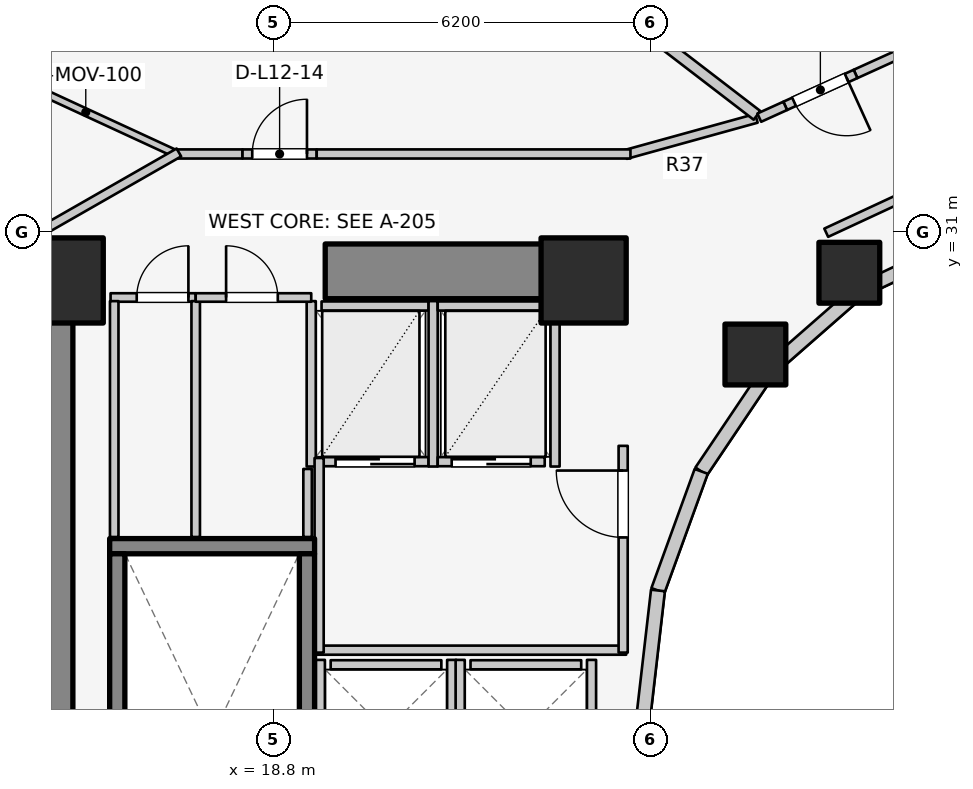
"""IFC4 building model, lengths in metres.
Left out: names, types, materials, properties, quantities, classifications, styles, units other than length and angle.
Written with IfcOpenShell. Run it as: python <this file> out.ifc"""

import sys

from ifc_helpers import new_model, si_unit, direction, frame, frame_2d, origin, origin_2d, place, context, subcontext, project, spatial, rectangle, extrude, element, fill, save


model = new_model("IFC4")
c1 = context("Model", 3, precision=1e-05, world=origin(), true_north=direction((0.0, 1.0)))
c2 = subcontext(c1, "Body", "Model", "MODEL_VIEW")
j1 = project(units=[si_unit("LENGTHUNIT", "METRE"), si_unit("PLANEANGLEUNIT", "RADIAN")], contexts=[c1])
p1 = place(None, origin())
s1 = spatial("IfcSite", under=j1, at=p1, CompositionType="ELEMENT")
p2 = place(p1, origin())
s2 = spatial("IfcBuilding", under=s1, at=p2, CompositionType="ELEMENT")
p3 = place(p2, frame((0.0, 0.0, 43.1)))
s3 = spatial("IfcBuildingStorey", under=s2, at=p3, CompositionType="ELEMENT", Elevation=43.1)
p4 = place(p3, frame((15.05, 17.05, 0.0), z_axis=(0.0, 0.0, 1.0), x_axis=(0.0, 1.0, 0.0)))
e1 = element("IfcWall", 1, at=p4, inside=s3, PredefinedType="SHEAR", context=c2, shape_type="SweptSolid", body=[
    extrude(rectangle(XDim=12.8, YDim=0.9, at=frame_2d((6.4, 0.0))), origin(), (0.0, 0.0, 1.0), 3.1),
])
p5 = place(p3, frame((19.65, 30.35, 0.0), z_axis=(0.0, 0.0, 1.0), x_axis=(1.0, 0.0, 0.0)))
e2 = element("IfcWall", 2, at=p5, inside=s3, PredefinedType="SHEAR", context=c2, shape_type="SweptSolid", body=[
    extrude(rectangle(XDim=4.5, YDim=0.9, at=frame_2d((2.25, 0.0))), origin(), (0.0, 0.0, 1.0), 3.1),
])
p6 = place(p3, frame((16.105, 25.83, 0.0), z_axis=(0.0, 0.0, 1.0), x_axis=(1.0, 0.0, 0.0)))
e3 = element("IfcWall", 3, at=p6, inside=s3, PredefinedType="SOLIDWALL", context=c2, shape_type="SweptSolid", body=[
    extrude(rectangle(XDim=3.37, YDim=0.25, at=frame_2d((1.685, 0.0))), origin(), (0.0, 0.0, 1.0), 3.1),
])
for number, where, z_axis, x_axis in (
    (4, (16.23, 17.895, 0.0), (0.0, 0.0, 1.0), (0.0, 1.0, 0.0)),
    (5, (19.35, 17.895, 0.0), (0.0, 0.0, 1.0), (0.0, 1.0, 0.0)),
):
    element("IfcWall", number, at=place(p3, frame(where, z_axis=z_axis, x_axis=x_axis)), inside=s3, PredefinedType="SOLIDWALL", context=c2, shape_type="SweptSolid", body=[
        extrude(rectangle(XDim=7.81, YDim=0.25, at=frame_2d((3.905, 0.0))), origin(), (0.0, 0.0, 1.0), 3.1),
    ])
for number, where, z_axis, x_axis in (
    (6, (23.9, 30.2, 0.0), (0.0, 0.0, 1.0), (1.0, 0.0, 0.0)),
    (7, (15.3, 30.2, 0.0), (0.0, 0.0, 1.0), (1.0, 0.0, 0.0)),
):
    element("IfcColumn", number, at=place(p3, frame(where, z_axis=z_axis, x_axis=x_axis)), inside=s3, PredefinedType="COLUMN", context=c2, shape_type="SweptSolid", body=[
        extrude(rectangle(XDim=1.4, YDim=1.4, at=origin_2d()), origin(), (0.0, 0.0, 1.0), 3.1),
    ])
for number, where, z_axis, x_axis in (
    (8, (28.27, 30.327, 0.0), (0.0, 0.0, 1.0), (1.0, 0.0, 0.0)),
    (9, (26.725, 28.982, 0.0), (0.0, 0.0, 1.0), (1.0, 0.0, 0.0)),
):
    element("IfcColumn", number, at=place(p3, frame(where, z_axis=z_axis, x_axis=x_axis)), inside=s3, PredefinedType="COLUMN", context=c2, shape_type="SweptSolid", body=[
        extrude(rectangle(XDim=1.0, YDim=1.0, at=origin_2d()), origin(), (0.0, 0.0, 1.0), 3.1),
    ])
p7 = place(p3, frame((30.157, 30.843, 0.0), z_axis=(0.0, 0.0, 1.0), x_axis=(-0.904179699603, -0.427152280606, 0.0)))
e10 = element("IfcWall", 10, at=p7, inside=s3, PredefinedType="STANDARD", context=c2, shape_type="SweptSolid", body=[
    extrude(rectangle(XDim=1.899, YDim=0.23, at=frame_2d((0.95, 0.0))), origin(), (0.0, 0.0, 1.0), 1.22),
])
p8 = place(p3, frame((28.44, 30.032, 0.0), z_axis=(0.0, 0.0, 1.0), x_axis=(-0.752576694707, -0.658504607869, 0.0)))
e11 = element("IfcWall", 11, at=p8, inside=s3, PredefinedType="STANDARD", context=c2, shape_type="SweptSolid", body=[
    extrude(rectangle(XDim=1.959, YDim=0.23, at=frame_2d((0.98, 0.0))), origin(), (0.0, 0.0, 1.0), 1.22),
])
p9 = place(p3, frame((26.965, 28.742, 0.0), z_axis=(0.0, 0.0, 1.0), x_axis=(-0.558197800898, -0.829707909492, 0.0)))
e12 = element("IfcWall", 12, at=p9, inside=s3, PredefinedType="STANDARD", context=c2, shape_type="SweptSolid", body=[
    extrude(rectangle(XDim=2.027, YDim=0.23, at=frame_2d((1.013, 0.0))), origin(), (0.0, 0.0, 1.0), 1.22),
])
p10 = place(p3, frame((25.834, 27.06, 0.0), z_axis=(0.0, 0.0, 1.0), x_axis=(-0.341423187295, -0.93990968033, 0.0)))
e13 = element("IfcWall", 13, at=p10, inside=s3, PredefinedType="STANDARD", context=c2, shape_type="SweptSolid", body=[
    extrude(rectangle(XDim=2.084, YDim=0.23, at=frame_2d((1.042, 0.0))), origin(), (0.0, 0.0, 1.0), 2.56),
])
p11 = place(p3, frame((25.123, 25.102, 0.0), z_axis=(0.0, 0.0, 1.0), x_axis=(-0.114711713601, -0.993398823617, 0.0)))
e14 = element("IfcWall", 14, at=p11, inside=s3, PredefinedType="STANDARD", context=c2, shape_type="SweptSolid", body=[
    extrude(rectangle(XDim=2.115, YDim=0.23, at=frame_2d((1.058, 0.0))), origin(), (0.0, 0.0, 1.0), 2.56),
])
p12 = place(p3, frame((19.74, 23.88, 0.0), z_axis=(0.0, 0.0, 1.0), x_axis=(1.0, 0.0, 0.0)))
e15 = element("IfcWall", 15, at=p12, inside=s3, PredefinedType="SOLIDWALL", context=c2, shape_type="SweptSolid", body=[
    extrude(rectangle(XDim=1.82, YDim=0.15, at=frame_2d((0.91, 0.0))), origin(), (0.0, 0.0, 1.0), 2.575),
])
for number, where, z_axis, x_axis in (
    (16, (19.57, 21.64, 0.0), (0.0, 0.0, 1.0), (0.0, 1.0, 0.0)),
    (17, (21.73, 21.64, 0.0), (0.0, 0.0, 1.0), (0.0, 1.0, 0.0)),
):
    element("IfcWall", number, at=place(p3, frame(where, z_axis=z_axis, x_axis=x_axis)), inside=s3, PredefinedType="SOLIDWALL", context=c2, shape_type="SweptSolid", body=[
        extrude(rectangle(XDim=2.32, YDim=0.15, at=frame_2d((1.16, 0.0))), origin(), (0.0, 0.0, 1.0), 2.575),
    ])
p13 = place(p3, frame((22.04, 23.88, 0.0), z_axis=(0.0, 0.0, 1.0), x_axis=(1.0, 0.0, 0.0)))
e18 = element("IfcWall", 18, at=p13, inside=s3, PredefinedType="SOLIDWALL", context=c2, shape_type="SweptSolid", body=[
    extrude(rectangle(XDim=1.82, YDim=0.15, at=frame_2d((0.91, 0.0))), origin(), (0.0, 0.0, 1.0), 2.12),
])
p14 = place(p3, frame((21.87, 21.64, 0.0), z_axis=(0.0, 0.0, 1.0), x_axis=(0.0, 1.0, 0.0)))
e19 = element("IfcWall", 19, at=p14, inside=s3, PredefinedType="SOLIDWALL", context=c2, shape_type="SweptSolid", body=[
    extrude(rectangle(XDim=2.32, YDim=0.15, at=frame_2d((1.16, 0.0))), origin(), (0.0, 0.0, 1.0), 2.575),
])
p15 = place(p3, frame((24.03, 21.64, 0.0), z_axis=(0.0, 0.0, 1.0), x_axis=(0.0, 1.0, 0.0)))
e20 = element("IfcWall", 20, at=p15, inside=s3, PredefinedType="SOLIDWALL", context=c2, shape_type="SweptSolid", body=[
    extrude(rectangle(XDim=2.32, YDim=0.15, at=frame_2d((1.16, 0.0))), origin(), (0.0, 0.0, 1.0), 2.12),
])
p16 = place(p3, frame((19.59, 27.22, 0.0), z_axis=(0.0, 0.0, 1.0), x_axis=(1.0, 0.0, 0.0)))
e21 = element("IfcWall", 21, at=p16, inside=s3, PredefinedType="SOLIDWALL", context=c2, shape_type="SweptSolid", body=[
    extrude(rectangle(XDim=1.76, YDim=0.15, at=frame_2d((0.88, 0.0))), origin(), (0.0, 0.0, 1.0), 2.575),
])
p17 = place(p16, frame((0.23, 0.0, 0.0)))
e22 = element("IfcOpeningElement", 22, at=p17, cuts=e21, PredefinedType="OPENING", context=c2, shape_type="SweptSolid", body=[
    extrude(rectangle(XDim=1.3, YDim=2.1, at=frame_2d((0.65, 1.05))), frame((0.0, 0.085, 0.0), z_axis=(0.0, -1.0, 0.0), x_axis=(1.0, 0.0, 0.0)), (0.0, 0.0, 1.0), 0.17),
])
p18 = place(p3, frame((19.59, 29.78, 0.0), z_axis=(0.0, 0.0, 1.0), x_axis=(1.0, 0.0, 0.0)))
e23 = element("IfcWall", 23, at=p18, inside=s3, PredefinedType="SOLIDWALL", context=c2, shape_type="SweptSolid", body=[
    extrude(rectangle(XDim=1.76, YDim=0.15, at=frame_2d((0.88, 0.0))), origin(), (0.0, 0.0, 1.0), 2.575),
])
for number, where, z_axis, x_axis in (
    (24, (19.42, 27.14, 0.0), (0.0, 0.0, 1.0), (0.0, 1.0, 0.0)),
    (25, (21.425, 27.14, 0.0), (0.0, 0.0, 1.0), (0.0, 1.0, 0.0)),
):
    element("IfcWall", number, at=place(p3, frame(where, z_axis=z_axis, x_axis=x_axis)), inside=s3, PredefinedType="SOLIDWALL", context=c2, shape_type="SweptSolid", body=[
        extrude(rectangle(XDim=2.72, YDim=0.15, at=frame_2d((1.36, 0.0))), origin(), (0.0, 0.0, 1.0), 2.575),
    ])
p19 = place(p3, frame((21.5, 27.22, 0.0), z_axis=(0.0, 0.0, 1.0), x_axis=(1.0, 0.0, 0.0)))
e26 = element("IfcWall", 26, at=p19, inside=s3, PredefinedType="SOLIDWALL", context=c2, shape_type="SweptSolid", body=[
    extrude(rectangle(XDim=1.76, YDim=0.15, at=frame_2d((0.88, 0.0))), origin(), (0.0, 0.0, 1.0), 2.575),
])
p20 = place(p19, frame((0.23, 0.0, 0.0)))
e27 = element("IfcOpeningElement", 27, at=p20, cuts=e26, PredefinedType="OPENING", context=c2, shape_type="SweptSolid", body=[
    extrude(rectangle(XDim=1.3, YDim=2.1, at=frame_2d((0.65, 1.05))), frame((0.0, 0.085, 0.0), z_axis=(0.0, -1.0, 0.0), x_axis=(1.0, 0.0, 0.0)), (0.0, 0.0, 1.0), 0.17),
])
p21 = place(p3, frame((21.5, 29.78, 0.0), z_axis=(0.0, 0.0, 1.0), x_axis=(1.0, 0.0, 0.0)))
e28 = element("IfcWall", 28, at=p21, inside=s3, PredefinedType="SOLIDWALL", context=c2, shape_type="SweptSolid", body=[
    extrude(rectangle(XDim=1.76, YDim=0.15, at=frame_2d((0.88, 0.0))), origin(), (0.0, 0.0, 1.0), 2.575),
])
p22 = place(p3, frame((23.43, 27.14, 0.0), z_axis=(0.0, 0.0, 1.0), x_axis=(0.0, 1.0, 0.0)))
e29 = element("IfcWall", 29, at=p22, inside=s3, PredefinedType="SOLIDWALL", context=c2, shape_type="SweptSolid", body=[
    extrude(rectangle(XDim=2.72, YDim=0.15, at=frame_2d((1.36, 0.0))), origin(), (0.0, 0.0, 1.0), 2.575),
])
p23 = place(p3, frame((19.52, 24.12, 0.0), z_axis=(0.0, 0.0, 1.0), x_axis=(1.0, 0.0, 0.0)))
e30 = element("IfcWall", 30, at=p23, inside=s3, PredefinedType="PARTITIONING", context=c2, shape_type="SweptSolid", body=[
    extrude(rectangle(XDim=5.08, YDim=0.15, at=frame_2d((2.54, 0.0))), origin(), (0.0, 0.0, 1.0), 2.12),
])
p24 = place(p3, frame((19.55, 24.08, 0.0), z_axis=(0.0, 0.0, 1.0), x_axis=(0.0, 1.0, 0.0)))
e31 = element("IfcWall", 31, at=p24, inside=s3, PredefinedType="PARTITIONING", context=c2, shape_type="SweptSolid", body=[
    extrude(rectangle(XDim=3.2, YDim=0.15, at=frame_2d((1.6, 0.0))), origin(), (0.0, 0.0, 1.0), 2.575),
])
p25 = place(p3, frame((24.55, 24.08, 0.0), z_axis=(0.0, 0.0, 1.0), x_axis=(0.0, 1.0, 0.0)))
e32 = element("IfcWall", 32, at=p25, inside=s3, PredefinedType="PARTITIONING", context=c2, shape_type="SweptSolid", body=[
    extrude(rectangle(XDim=3.4, YDim=0.15, at=frame_2d((1.7, 0.0))), origin(), (0.0, 0.0, 1.0), 2.575),
])
p26 = place(p25, frame((1.894, 0.0, 0.0)))
e33 = element("IfcOpeningElement", 33, at=p26, cuts=e32, PredefinedType="OPENING", context=c2, shape_type="SweptSolid", body=[
    extrude(rectangle(XDim=1.1, YDim=2.1, at=frame_2d((0.55, 1.05))), frame((0.0, 0.085, 0.0), z_axis=(0.0, -1.0, 0.0), x_axis=(1.0, 0.0, 0.0)), (0.0, 0.0, 1.0), 0.17),
])
p27 = place(p3, frame((16.12, 29.92, 0.0), z_axis=(0.0, 0.0, 1.0), x_axis=(1.0, 0.0, 0.0)))
e34 = element("IfcWall", 34, at=p27, inside=s3, PredefinedType="PLUMBINGWALL", context=c2, shape_type="SweptSolid", body=[
    extrude(rectangle(XDim=1.4, YDim=0.14, at=frame_2d((0.7, 0.0))), origin(), (0.0, 0.0, 1.0), 2.575),
])
p28 = place(p27, frame((0.43, 0.0, 0.0)))
e35 = element("IfcOpeningElement", 35, at=p28, cuts=e34, PredefinedType="OPENING", context=c2, shape_type="SweptSolid", body=[
    extrude(rectangle(XDim=0.85, YDim=2.05, at=frame_2d((0.425, 1.025))), frame((0.0, 0.08, 0.0), z_axis=(0.0, -1.0, 0.0), x_axis=(1.0, 0.0, 0.0)), (0.0, 0.0, 1.0), 0.16),
])
for number, where, z_axis, x_axis in (
    (36, (16.18, 25.98, 0.0), (0.0, 0.0, 1.0), (0.0, 1.0, 0.0)),
    (37, (17.52, 25.98, 0.0), (0.0, 0.0, 1.0), (0.0, 1.0, 0.0)),
):
    element("IfcWall", number, at=place(p3, frame(where, z_axis=z_axis, x_axis=x_axis)), inside=s3, PredefinedType="PLUMBINGWALL", context=c2, shape_type="SweptSolid", body=[
        extrude(rectangle(XDim=3.88, YDim=0.14, at=frame_2d((1.94, 0.0))), origin(), (0.0, 0.0, 1.0), 2.575),
    ])
p29 = place(p3, frame((17.52, 29.92, 0.0), z_axis=(0.0, 0.0, 1.0), x_axis=(1.0, 0.0, 0.0)))
e38 = element("IfcWall", 38, at=p29, inside=s3, PredefinedType="PLUMBINGWALL", context=c2, shape_type="SweptSolid", body=[
    extrude(rectangle(XDim=1.9, YDim=0.14, at=frame_2d((0.95, 0.0))), origin(), (0.0, 0.0, 1.0), 2.575),
])
p30 = place(p29, frame((0.5, 0.0, 0.0)))
e39 = element("IfcOpeningElement", 39, at=p30, cuts=e38, PredefinedType="OPENING", context=c2, shape_type="SweptSolid", body=[
    extrude(rectangle(XDim=0.85, YDim=2.05, at=frame_2d((0.425, 1.025))), frame((0.0, 0.08, 0.0), z_axis=(0.0, -1.0, 0.0), x_axis=(1.0, 0.0, 0.0)), (0.0, 0.0, 1.0), 0.16),
])
p31 = place(p3, frame((19.36, 25.98, 0.0), z_axis=(0.0, 0.0, 1.0), x_axis=(0.0, 1.0, 0.0)))
e40 = element("IfcWall", 40, at=p31, inside=s3, PredefinedType="PLUMBINGWALL", context=c2, shape_type="SweptSolid", body=[
    extrude(rectangle(XDim=1.12, YDim=0.14, at=frame_2d((0.56, 0.0))), origin(), (0.0, 0.0, 1.0), 2.575),
])
p32 = place(p3, frame((29.873, 31.906, 0.0), z_axis=(0.0, 0.0, 1.0), x_axis=(-0.906943449489, -0.421252393975, 0.0)))
e41 = element("IfcWall", 41, at=p32, inside=s3, PredefinedType="PARTITIONING", context=c2, shape_type="SweptSolid", body=[
    extrude(rectangle(XDim=2.186, YDim=0.15, at=frame_2d((1.093, 0.0))), origin(), (0.0, 0.0, 1.0), 1.22),
])
p33 = place(p3, frame((17.245, 32.259, 0.0), z_axis=(0.0, 0.0, 1.0), x_axis=(-0.907887445426, 0.419214010307, 0.0)))
e42 = element("IfcWall", 42, at=p33, inside=s3, PredefinedType="MOVABLE", context=c2, shape_type="SweptSolid", body=[
    extrude(rectangle(XDim=3.378, YDim=0.12, at=frame_2d((1.689, 0.0))), origin(), (0.0, 0.0, 1.0), 1.22),
])
p34 = place(p3, frame((26.742, 32.867, 0.0), z_axis=(0.0, 0.0, 1.0), x_axis=(-0.963833843713, -0.266503886865, 0.0)))
e43 = element("IfcWall", 43, at=p34, inside=s3, PredefinedType="PARTITIONING", context=c2, shape_type="SweptSolid", body=[
    extrude(rectangle(XDim=2.232, YDim=0.15, at=frame_2d((1.116, 0.0))), origin(), (0.0, 0.0, 1.0), 1.22),
])
p35 = place(p3, frame((17.15, 32.28, 0.0), z_axis=(0.0, 0.0, 1.0), x_axis=(1.0, 0.0, 0.0)))
e44 = element("IfcWall", 44, at=p35, inside=s3, PredefinedType="PARTITIONING", context=c2, shape_type="SweptSolid", body=[
    extrude(rectangle(XDim=1.14, YDim=0.15, at=frame_2d((0.57, 0.0))), origin(), (0.0, 0.0, 1.0), 2.575),
])
p36 = place(p3, frame((18.29, 32.28, 0.0), z_axis=(0.0, 0.0, 1.0), x_axis=(1.0, 0.0, 0.0)))
e45 = element("IfcWall", 45, at=p36, inside=s3, PredefinedType="PARTITIONING", context=c2, shape_type="SweptSolid", body=[
    extrude(rectangle(XDim=1.22, YDim=0.15, at=frame_2d((0.61, 0.0))), origin(), (0.0, 0.0, 1.0), 2.575),
])
p37 = place(p36, frame((0.16, 0.0, 0.0)))
e46 = element("IfcOpeningElement", 46, at=p37, cuts=e45, PredefinedType="OPENING", context=c2, shape_type="SweptSolid", body=[
    extrude(rectangle(XDim=0.9, YDim=2.1, at=frame_2d((0.45, 1.05))), frame((0.0, 0.085, 0.0), z_axis=(0.0, -1.0, 0.0), x_axis=(1.0, 0.0, 0.0)), (0.0, 0.0, 1.0), 0.17),
])
p38 = place(p3, frame((19.51, 32.28, 0.0), z_axis=(0.0, 0.0, 1.0), x_axis=(1.0, 0.0, 0.0)))
e47 = element("IfcWall", 47, at=p38, inside=s3, PredefinedType="PARTITIONING", context=c2, shape_type="SweptSolid", body=[
    extrude(rectangle(XDim=5.16, YDim=0.15, at=frame_2d((2.58, 0.0))), origin(), (0.0, 0.0, 1.0), 1.22),
])
p39 = place(p3, frame((17.243, 32.305, 0.0), z_axis=(0.0, 0.0, 1.0), x_axis=(-0.867991349648, -0.496579315857, 0.0)))
e48 = element("IfcWall", 48, at=p39, inside=s3, PredefinedType="PARTITIONING", context=c2, shape_type="SweptSolid", body=[
    extrude(rectangle(XDim=2.567, YDim=0.15, at=frame_2d((1.283, 0.0))), origin(), (0.0, 0.0, 1.0), 1.22),
])
p40 = place(p3, frame((26.751, 32.915, 0.0), z_axis=(0.0, 0.0, 1.0), x_axis=(-0.793181014702, 0.608985942298, 0.0)))
e49 = element("IfcWall", 49, at=p40, inside=s3, PredefinedType="PARTITIONING", context=c2, shape_type="SweptSolid", body=[
    extrude(rectangle(XDim=10.324, YDim=0.18, at=frame_2d((5.162, 0.0))), origin(), (0.0, 0.0, 1.0), 1.22),
])
p41 = place(p3, frame((29.313, 34.023, 0.0), z_axis=(0.0, 0.0, 1.0), x_axis=(-0.910657491524, -0.413162114831, 0.0)))
e50 = element("IfcWall", 50, at=p41, inside=s3, PredefinedType="PARTITIONING", context=c2, shape_type="SweptSolid", body=[
    extrude(rectangle(XDim=1.033, YDim=0.15, at=frame_2d((0.517, 0.0))), origin(), (0.0, 0.0, 1.0), 1.22),
])
p42 = place(p3, frame((28.372, 33.596, 0.0), z_axis=(0.0, 0.0, 1.0), x_axis=(-0.910491529429, -0.413527719553, 0.0)))
e51 = element("IfcWall", 51, at=p42, inside=s3, PredefinedType="PARTITIONING", context=c2, shape_type="SweptSolid", body=[
    extrude(rectangle(XDim=1.27, YDim=0.15, at=frame_2d((0.635, 0.0))), origin(), (0.0, 0.0, 1.0), 2.16),
])
p43 = place(p42, frame((0.16, 0.0, 0.0)))
e52 = element("IfcOpeningElement", 52, at=p43, cuts=e51, PredefinedType="OPENING", context=c2, shape_type="SweptSolid", body=[
    extrude(rectangle(XDim=0.95, YDim=2.1, at=frame_2d((0.475, 1.05))), frame((0.0, 0.085, 0.0), z_axis=(0.0, -1.0, 0.0), x_axis=(1.0, 0.0, 0.0)), (0.0, 0.0, 1.0), 0.17),
])
p44 = place(p3, frame((27.215, 33.071, 0.0), z_axis=(0.0, 0.0, 1.0), x_axis=(-0.910580557663, -0.413331644091, 0.0)))
e53 = element("IfcWall", 53, at=p44, inside=s3, PredefinedType="PARTITIONING", context=c2, shape_type="SweptSolid", body=[
    extrude(rectangle(XDim=0.469, YDim=0.15, at=frame_2d((0.234, 0.0))), origin(), (0.0, 0.0, 1.0), 2.575),
])
p45 = place(p17, origin())
e54 = element("IfcDoor", 54, at=p45, inside=s3, OperationType="DOUBLE_DOOR_SLIDING", PredefinedType="DOOR", context=c2, shape_type="SweptSolid", body=[
    extrude(rectangle(XDim=1.3, YDim=2.1, at=frame_2d((0.65, 1.05))), frame((0.0, 0.025, 0.0), z_axis=(0.0, -1.0, 0.0), x_axis=(1.0, 0.0, 0.0)), (0.0, 0.0, 1.0), 0.05),
])
fill(e22, e54)
p46 = place(p20, origin())
e55 = element("IfcDoor", 55, at=p46, inside=s3, OperationType="DOUBLE_DOOR_SLIDING", PredefinedType="DOOR", context=c2, shape_type="SweptSolid", body=[
    extrude(rectangle(XDim=1.3, YDim=2.1, at=frame_2d((0.65, 1.05))), frame((0.0, 0.025, 0.0), z_axis=(0.0, -1.0, 0.0), x_axis=(1.0, 0.0, 0.0)), (0.0, 0.0, 1.0), 0.05),
])
fill(e27, e55)
p47 = place(p26, origin())
e56 = element("IfcDoor", 56, at=p47, inside=s3, OperationType="SINGLE_SWING_RIGHT", PredefinedType="DOOR", context=c2, shape_type="SweptSolid", body=[
    extrude(rectangle(XDim=1.1, YDim=2.1, at=frame_2d((0.55, 1.05))), frame((0.0, 0.025, 0.0), z_axis=(0.0, -1.0, 0.0), x_axis=(1.0, 0.0, 0.0)), (0.0, 0.0, 1.0), 0.05),
])
fill(e33, e56)
p48 = place(p28, origin())
e57 = element("IfcDoor", 57, at=p48, inside=s3, OperationType="SINGLE_SWING_RIGHT", PredefinedType="DOOR", context=c2, shape_type="SweptSolid", body=[
    extrude(rectangle(XDim=0.85, YDim=2.05, at=frame_2d((0.425, 1.025))), frame((0.0, 0.025, 0.0), z_axis=(0.0, -1.0, 0.0), x_axis=(1.0, 0.0, 0.0)), (0.0, 0.0, 1.0), 0.05),
])
fill(e35, e57)
p49 = place(p30, origin())
e58 = element("IfcDoor", 58, at=p49, inside=s3, OperationType="SINGLE_SWING_LEFT", PredefinedType="DOOR", context=c2, shape_type="SweptSolid", body=[
    extrude(rectangle(XDim=0.85, YDim=2.05, at=frame_2d((0.425, 1.025))), frame((0.0, 0.025, 0.0), z_axis=(0.0, -1.0, 0.0), x_axis=(1.0, 0.0, 0.0)), (0.0, 0.0, 1.0), 0.05),
])
fill(e39, e58)
p50 = place(p37, origin())
e59 = element("IfcDoor", 59, at=p50, inside=s3, OperationType="SINGLE_SWING_RIGHT", PredefinedType="DOOR", context=c2, shape_type="SweptSolid", body=[
    extrude(rectangle(XDim=0.9, YDim=2.1, at=frame_2d((0.45, 1.05))), frame((0.0, 0.025, 0.0), z_axis=(0.0, -1.0, 0.0), x_axis=(1.0, 0.0, 0.0)), (0.0, 0.0, 1.0), 0.05),
])
fill(e46, e59)
p51 = place(p43, origin())
e60 = element("IfcDoor", 60, at=p51, inside=s3, OperationType="SINGLE_SWING_LEFT", PredefinedType="DOOR", context=c2, shape_type="SweptSolid", body=[
    extrude(rectangle(XDim=0.95, YDim=2.1, at=frame_2d((0.475, 1.05))), frame((0.0, 0.025, 0.0), z_axis=(0.0, -1.0, 0.0), x_axis=(1.0, 0.0, 0.0)), (0.0, 0.0, 1.0), 0.05),
])
fill(e52, e60)
save(model, sys.argv[1])
